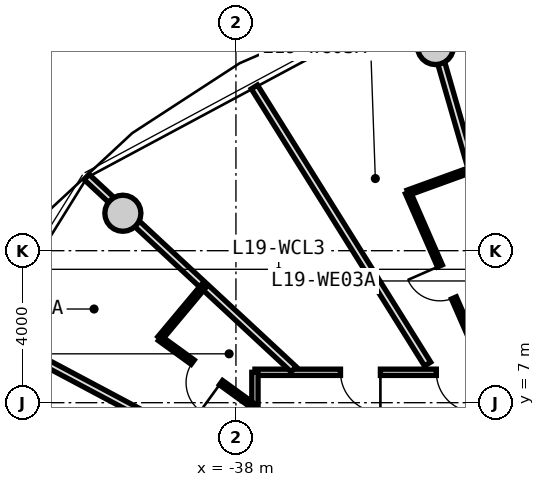
"""IFC4 building model, lengths in metres.
Left out: names, types, materials, properties, quantities, classifications, styles, units other than length and angle.
Written with IfcOpenShell. Run it as: python <this file> out.ifc"""

import sys

from ifc_helpers import new_model, si_unit, direction, frame, frame_2d, origin, origin_2d, place, context, subcontext, project, spatial, rectangle, circle, extrude, source, transform, mapped, element, fill, save


model = new_model("IFC4")
c1 = context("Model", 3, precision=1e-05, world=origin(), true_north=direction((0.0, 1.0)))
c2 = subcontext(c1, "Body", "Model", "MODEL_VIEW")
j1 = project(units=[si_unit("LENGTHUNIT", "METRE"), si_unit("PLANEANGLEUNIT", "RADIAN")], contexts=[c1])
p1 = place(None, origin())
s1 = spatial("IfcSite", under=j1, at=p1, CompositionType="ELEMENT")
p2 = place(p1, origin())
s2 = spatial("IfcBuilding", under=s1, at=p2, CompositionType="ELEMENT")
p3 = place(p2, frame((0.0, 0.0, 64.3)))
s3 = spatial("IfcBuildingStorey", under=s2, at=p3, CompositionType="ELEMENT", Elevation=64.3)
m1 = source(origin(), c2, "Body", "SweptSolid", [
    extrude(circle(Radius=0.475, at=origin_2d()), origin(), (0.0, 0.0, 1.0), 3.05),
])
for number, where, z_axis, x_axis in (
    (1, (-32.749, 16.373, 0.0), (0.0, 0.0, 1.0), (1.0, 0.0, 0.0)),
    (2, (-40.975, 11.985, 0.0), (0.0, 0.0, 1.0), (1.0, 0.0, 0.0)),
):
    element("IfcColumn", number, at=place(p3, frame(where, z_axis=z_axis, x_axis=x_axis)), inside=s3, PredefinedType="COLUMN", context=c2, shape_type="MappedRepresentation", body=[
        mapped(m1, transform((0.0, 0.0, 0.0), x_axis=(1.0, 0.0, 0.0), y_axis=(0.0, 1.0, 0.0), z_axis=(0.0, 0.0, 1.0), scale=1.0)),
    ])
m2 = source(origin(), c2, "Body", "SweptSolid", [
    extrude(rectangle(XDim=19.0, YDim=0.165, at=frame_2d((9.5, 0.0))), origin(), (0.0, 0.0, 1.0), 2.775),
])
p4 = place(p3, frame((-37.5, 7.8, 0.0), z_axis=(0.0, 0.0, 1.0), x_axis=(1.0, 0.0, 0.0)))
e3 = element("IfcWall", 3, at=p4, inside=s3, PredefinedType="PARTITIONING", context=c2, shape_type="MappedRepresentation", body=[
    mapped(m2, transform((0.0, 0.0, 0.0), x_axis=(1.0, 0.0, 0.0), y_axis=(0.0, 1.0, 0.0), z_axis=(0.0, 0.0, 1.0), scale=1.0)),
])
p5 = place(p4, frame((14.653, 0.0, 0.0)))
e4 = element("IfcOpeningElement", 4, at=p5, cuts=e3, PredefinedType="OPENING", context=c2, shape_type="SweptSolid", body=[
    extrude(rectangle(XDim=1.05, YDim=2.15, at=frame_2d((0.525, 1.075))), frame((0.0, 0.093, 0.0), z_axis=(0.0, -1.0, 0.0), x_axis=(1.0, 0.0, 0.0)), (0.0, 0.0, 1.0), 0.185),
])
p6 = place(p4, frame((12.5, 0.0, 0.0)))
e5 = element("IfcOpeningElement", 5, at=p6, cuts=e3, PredefinedType="OPENING", context=c2, shape_type="SweptSolid", body=[
    extrude(rectangle(XDim=1.05, YDim=2.15, at=frame_2d((0.525, 1.075))), frame((0.0, 0.093, 0.0), z_axis=(0.0, -1.0, 0.0), x_axis=(1.0, 0.0, 0.0)), (0.0, 0.0, 1.0), 0.185),
])
p7 = place(p4, frame((9.352, 0.0, 0.0)))
e6 = element("IfcOpeningElement", 6, at=p7, cuts=e3, PredefinedType="OPENING", context=c2, shape_type="SweptSolid", body=[
    extrude(rectangle(XDim=1.05, YDim=2.15, at=frame_2d((0.525, 1.075))), frame((0.0, 0.093, 0.0), z_axis=(0.0, -1.0, 0.0), x_axis=(1.0, 0.0, 0.0)), (0.0, 0.0, 1.0), 0.185),
])
p8 = place(p4, frame((7.806, 0.0, 0.0)))
e7 = element("IfcOpeningElement", 7, at=p8, cuts=e3, PredefinedType="OPENING", context=c2, shape_type="SweptSolid", body=[
    extrude(rectangle(XDim=1.05, YDim=2.15, at=frame_2d((0.525, 1.075))), frame((0.0, 0.093, 0.0), z_axis=(0.0, -1.0, 0.0), x_axis=(1.0, 0.0, 0.0)), (0.0, 0.0, 1.0), 0.185),
])
p9 = place(p4, frame((4.773, 0.0, 0.0)))
e8 = element("IfcOpeningElement", 8, at=p9, cuts=e3, PredefinedType="OPENING", context=c2, shape_type="SweptSolid", body=[
    extrude(rectangle(XDim=1.05, YDim=2.15, at=frame_2d((0.525, 1.075))), frame((0.0, 0.093, 0.0), z_axis=(0.0, -1.0, 0.0), x_axis=(1.0, 0.0, 0.0)), (0.0, 0.0, 1.0), 0.185),
])
p10 = place(p4, frame((2.251, 0.0, 0.0)))
e9 = element("IfcOpeningElement", 9, at=p10, cuts=e3, PredefinedType="OPENING", context=c2, shape_type="SweptSolid", body=[
    extrude(rectangle(XDim=1.05, YDim=2.15, at=frame_2d((0.525, 1.075))), frame((0.0, 0.093, 0.0), z_axis=(0.0, -1.0, 0.0), x_axis=(1.0, 0.0, 0.0)), (0.0, 0.0, 1.0), 0.185),
])
m3 = source(origin(), c2, "Body", "SweptSolid", [
    extrude(rectangle(XDim=15.6, YDim=0.165, at=frame_2d((7.8, 0.0))), origin(), (0.0, 0.0, 1.0), 2.775),
])
p11 = place(p3, frame((-37.5, -7.8, 0.0), z_axis=(0.0, 0.0, 1.0), x_axis=(0.0, 1.0, 0.0)))
e10 = element("IfcWall", 10, at=p11, inside=s3, PredefinedType="PARTITIONING", context=c2, shape_type="MappedRepresentation", body=[
    mapped(m3, transform((0.0, 0.0, 0.0), x_axis=(1.0, 0.0, 0.0), y_axis=(0.0, 1.0, 0.0), z_axis=(0.0, 0.0, 1.0), scale=1.0)),
])
p12 = place(p11, frame((7.812, 0.0, 0.0)))
e11 = element("IfcOpeningElement", 11, at=p12, cuts=e10, PredefinedType="OPENING", context=c2, shape_type="SweptSolid", body=[
    extrude(rectangle(XDim=1.05, YDim=2.15, at=frame_2d((0.525, 1.075))), frame((0.0, 0.093, 0.0), z_axis=(0.0, -1.0, 0.0), x_axis=(1.0, 0.0, 0.0)), (0.0, 0.0, 1.0), 0.185),
])
p13 = place(p11, frame((6.035, 0.0, 0.0)))
e12 = element("IfcOpeningElement", 12, at=p13, cuts=e10, PredefinedType="OPENING", context=c2, shape_type="SweptSolid", body=[
    extrude(rectangle(XDim=1.05, YDim=2.15, at=frame_2d((0.525, 1.075))), frame((0.0, 0.093, 0.0), z_axis=(0.0, -1.0, 0.0), x_axis=(1.0, 0.0, 0.0)), (0.0, 0.0, 1.0), 0.185),
])
p14 = place(p11, frame((2.826, 0.0, 0.0)))
e13 = element("IfcOpeningElement", 13, at=p14, cuts=e10, PredefinedType="OPENING", context=c2, shape_type="SweptSolid", body=[
    extrude(rectangle(XDim=1.05, YDim=2.15, at=frame_2d((0.525, 1.075))), frame((0.0, 0.093, 0.0), z_axis=(0.0, -1.0, 0.0), x_axis=(1.0, 0.0, 0.0)), (0.0, 0.0, 1.0), 0.185),
])
p15 = place(p11, frame((0.881, 0.0, 0.0)))
e14 = element("IfcOpeningElement", 14, at=p15, cuts=e10, PredefinedType="OPENING", context=c2, shape_type="SweptSolid", body=[
    extrude(rectangle(XDim=1.05, YDim=2.15, at=frame_2d((0.525, 1.075))), frame((0.0, 0.093, 0.0), z_axis=(0.0, -1.0, 0.0), x_axis=(1.0, 0.0, 0.0)), (0.0, 0.0, 1.0), 0.185),
])
p16 = place(p11, frame((13.293, 0.0, 0.0)))
e15 = element("IfcOpeningElement", 15, at=p16, cuts=e10, PredefinedType="OPENING", context=c2, shape_type="SweptSolid", body=[
    extrude(rectangle(XDim=1.05, YDim=2.15, at=frame_2d((0.525, 1.075))), frame((0.0, 0.093, 0.0), z_axis=(0.0, -1.0, 0.0), x_axis=(1.0, 0.0, 0.0)), (0.0, 0.0, 1.0), 0.185),
])
p17 = place(p11, frame((11.018, 0.0, 0.0)))
e16 = element("IfcOpeningElement", 16, at=p17, cuts=e10, PredefinedType="OPENING", context=c2, shape_type="SweptSolid", body=[
    extrude(rectangle(XDim=1.05, YDim=2.15, at=frame_2d((0.525, 1.075))), frame((0.0, 0.093, 0.0), z_axis=(0.0, -1.0, 0.0), x_axis=(1.0, 0.0, 0.0)), (0.0, 0.0, 1.0), 0.185),
])
m4 = source(origin(), c2, "Body", "SweptSolid", [
    extrude(rectangle(XDim=10.196, YDim=0.19, at=frame_2d((5.098, 0.0))), origin(), (0.0, 0.0, 1.0), 2.225),
])
p18 = place(p3, frame((-30.273, 7.88, 0.0), z_axis=(0.0, 0.0, 1.0), x_axis=(-0.277136420347, 0.960830580549, 0.0)))
e17 = element("IfcWall", 17, at=p18, inside=s3, PredefinedType="PARTITIONING", context=c2, shape_type="MappedRepresentation", body=[
    mapped(m4, transform((0.0, 0.0, 0.0), x_axis=(1.0, 0.0, 0.0), y_axis=(0.0, 1.0, 0.0), z_axis=(0.0, 0.0, 1.0), scale=1.0)),
])
m5 = source(origin(), c2, "Body", "SweptSolid", [
    extrude(rectangle(XDim=7.435, YDim=0.19, at=frame_2d((3.717, 0.0))), origin(), (0.0, 0.0, 1.0), 2.225),
])
p19 = place(p3, frame((-36.483, 7.88, 0.0), z_axis=(0.0, 0.0, 1.0), x_axis=(-0.732651956848, 0.680603489652, 0.0)))
e18 = element("IfcWall", 18, at=p19, inside=s3, PredefinedType="PARTITIONING", context=c2, shape_type="MappedRepresentation", body=[
    mapped(m5, transform((0.0, 0.0, 0.0), x_axis=(1.0, 0.0, 0.0), y_axis=(0.0, 1.0, 0.0), z_axis=(0.0, 0.0, 1.0), scale=1.0)),
])
m6 = source(origin(), c2, "Body", "SweptSolid", [
    extrude(rectangle(XDim=8.598, YDim=0.19, at=frame_2d((4.299, 0.0))), origin(), (0.0, 0.0, 1.0), 2.775),
])
p20 = place(p3, frame((-32.957, 8.017, 0.0), z_axis=(0.0, 0.0, 1.0), x_axis=(-0.530039776395, 0.847972779893, 0.0)))
e19 = element("IfcWall", 19, at=p20, inside=s3, PredefinedType="PARTITIONING", context=c2, shape_type="MappedRepresentation", body=[
    mapped(m6, transform((0.0, 0.0, 0.0), x_axis=(1.0, 0.0, 0.0), y_axis=(0.0, 1.0, 0.0), z_axis=(0.0, 0.0, 1.0), scale=1.0)),
])
m7 = source(origin(), c2, "Body", "SweptSolid", [
    extrude(rectangle(XDim=5.126, YDim=0.14, at=frame_2d((2.563, 0.0))), origin(), (0.0, 0.0, 1.0), 2.775),
])
p21 = place(p3, frame((-31.422, 7.83, 0.0), z_axis=(0.0, 0.0, 1.0), x_axis=(-0.400473994842, 0.916308124735, 0.0)))
e20 = element("IfcWall", 20, at=p21, inside=s3, PredefinedType="PARTITIONING", context=c2, shape_type="MappedRepresentation", body=[
    mapped(m7, transform((0.0, 0.0, 0.0), x_axis=(1.0, 0.0, 0.0), y_axis=(0.0, 1.0, 0.0), z_axis=(0.0, 0.0, 1.0), scale=1.0)),
])
p22 = place(p21, frame((2.103, 0.0, 0.0)))
e21 = element("IfcOpeningElement", 21, at=p22, cuts=e20, PredefinedType="OPENING", context=c2, shape_type="SweptSolid", body=[
    extrude(rectangle(XDim=0.92, YDim=2.1, at=frame_2d((0.46, 1.05))), frame((0.0, 0.08, 0.0), z_axis=(0.0, -1.0, 0.0), x_axis=(1.0, 0.0, 0.0)), (0.0, 0.0, 1.0), 0.16),
])
m8 = source(origin(), c2, "Body", "SweptSolid", [
    extrude(rectangle(XDim=1.811, YDim=0.14, at=frame_2d((0.906, 0.0))), origin(), (0.0, 0.0, 1.0), 2.775),
])
p23 = place(p3, frame((-33.475, 12.527, 0.0), z_axis=(0.0, 0.0, 1.0), x_axis=(0.940009682452, 0.341147764021, 0.0)))
e22 = element("IfcWall", 22, at=p23, inside=s3, PredefinedType="PARTITIONING", context=c2, shape_type="MappedRepresentation", body=[
    mapped(m8, transform((0.0, 0.0, 0.0), x_axis=(1.0, 0.0, 0.0), y_axis=(0.0, 1.0, 0.0), z_axis=(0.0, 0.0, 1.0), scale=1.0)),
])
m9 = source(origin(), c2, "Body", "SweptSolid", [
    extrude(rectangle(XDim=7.677, YDim=0.19, at=frame_2d((3.838, 0.0))), origin(), (0.0, 0.0, 1.0), 2.775),
])
p24 = place(p3, frame((-37.703, 5.231, 0.0), z_axis=(0.0, 0.0, 1.0), x_axis=(-0.882725057546, 0.469889851753, 0.0)))
e23 = element("IfcWall", 23, at=p24, inside=s3, PredefinedType="PARTITIONING", context=c2, shape_type="MappedRepresentation", body=[
    mapped(m9, transform((0.0, 0.0, 0.0), x_axis=(1.0, 0.0, 0.0), y_axis=(0.0, 1.0, 0.0), z_axis=(0.0, 0.0, 1.0), scale=1.0)),
])
m10 = source(origin(), c2, "Body", "SweptSolid", [
    extrude(rectangle(XDim=3.051, YDim=0.14, at=frame_2d((1.525, 0.0))), origin(), (0.0, 0.0, 1.0), 2.775),
])
p25 = place(p3, frame((-37.53, 6.903, 0.0), z_axis=(0.0, 0.0, 1.0), x_axis=(-0.809849031404, 0.586638343729, 0.0)))
e24 = element("IfcWall", 24, at=p25, inside=s3, PredefinedType="PARTITIONING", context=c2, shape_type="MappedRepresentation", body=[
    mapped(m10, transform((0.0, 0.0, 0.0), x_axis=(1.0, 0.0, 0.0), y_axis=(0.0, 1.0, 0.0), z_axis=(0.0, 0.0, 1.0), scale=1.0)),
])
p26 = place(p25, frame((1.065, 0.0, 0.0)))
e25 = element("IfcOpeningElement", 25, at=p26, cuts=e24, PredefinedType="OPENING", context=c2, shape_type="SweptSolid", body=[
    extrude(rectangle(XDim=0.92, YDim=2.1, at=frame_2d((0.46, 1.05))), frame((0.0, 0.08, 0.0), z_axis=(0.0, -1.0, 0.0), x_axis=(1.0, 0.0, 0.0)), (0.0, 0.0, 1.0), 0.16),
])
m11 = source(origin(), c2, "Body", "SweptSolid", [
    extrude(rectangle(XDim=1.84, YDim=0.14, at=frame_2d((0.92, 0.0))), origin(), (0.0, 0.0, 1.0), 2.415),
])
p27 = place(p3, frame((-40.0, 8.692, 0.0), z_axis=(0.0, 0.0, 1.0), x_axis=(0.641410397049, 0.767197955262, 0.0)))
e26 = element("IfcWall", 26, at=p27, inside=s3, PredefinedType="PARTITIONING", context=c2, shape_type="MappedRepresentation", body=[
    mapped(m11, transform((0.0, 0.0, 0.0), x_axis=(1.0, 0.0, 0.0), y_axis=(0.0, 1.0, 0.0), z_axis=(0.0, 0.0, 1.0), scale=1.0)),
])
m12 = source(origin(), c2, "Body", "SweptSolid", [
    extrude(rectangle(XDim=1.05, YDim=2.15, at=frame_2d((0.525, 1.075))), frame((0.0, 0.025, 0.0), z_axis=(0.0, -1.0, 0.0), x_axis=(1.0, 0.0, 0.0)), (0.0, 0.0, 1.0), 0.05),
])
p28 = place(p9, frame((1.05, 0.0, 0.0), z_axis=(0.0, 0.0, 1.0), x_axis=(-1.0, 0.0, 0.0)))
e27 = element("IfcDoor", 27, at=p28, inside=s3, OperationType="SINGLE_SWING_LEFT", PredefinedType="DOOR", context=c2, shape_type="MappedRepresentation", body=[
    mapped(m12, transform((0.0, 0.0, 0.0), x_axis=(1.0, 0.0, 0.0), y_axis=(0.0, 1.0, 0.0), z_axis=(0.0, 0.0, 1.0), scale=1.0)),
])
fill(e8, e27)
m13 = source(origin(), c2, "Body", "SweptSolid", [
    extrude(rectangle(XDim=0.92, YDim=2.1, at=frame_2d((0.46, 1.05))), frame((0.0, 0.025, 0.0), z_axis=(0.0, -1.0, 0.0), x_axis=(1.0, 0.0, 0.0)), (0.0, 0.0, 1.0), 0.05),
])
p29 = place(p22, origin())
e28 = element("IfcDoor", 28, at=p29, inside=s3, OperationType="SINGLE_SWING_RIGHT", PredefinedType="DOOR", context=c2, shape_type="MappedRepresentation", body=[
    mapped(m13, transform((0.0, 0.0, 0.0), x_axis=(1.0, 0.0, 0.0), y_axis=(0.0, 1.0, 0.0), z_axis=(0.0, 0.0, 1.0), scale=1.0)),
])
fill(e21, e28)
p30 = place(p10, frame((1.05, 0.0, 0.0), z_axis=(0.0, 0.0, 1.0), x_axis=(-1.0, 0.0, 0.0)))
e29 = element("IfcDoor", 29, at=p30, inside=s3, OperationType="SINGLE_SWING_LEFT", PredefinedType="DOOR", context=c2, shape_type="MappedRepresentation", body=[
    mapped(m12, transform((0.0, 0.0, 0.0), x_axis=(1.0, 0.0, 0.0), y_axis=(0.0, 1.0, 0.0), z_axis=(0.0, 0.0, 1.0), scale=1.0)),
])
fill(e9, e29)
p31 = place(p26, origin())
e30 = element("IfcDoor", 30, at=p31, inside=s3, OperationType="SINGLE_SWING_LEFT", PredefinedType="DOOR", context=c2, shape_type="MappedRepresentation", body=[
    mapped(m13, transform((0.0, 0.0, 0.0), x_axis=(1.0, 0.0, 0.0), y_axis=(0.0, 1.0, 0.0), z_axis=(0.0, 0.0, 1.0), scale=1.0)),
])
fill(e25, e30)
save(model, sys.argv[1])
